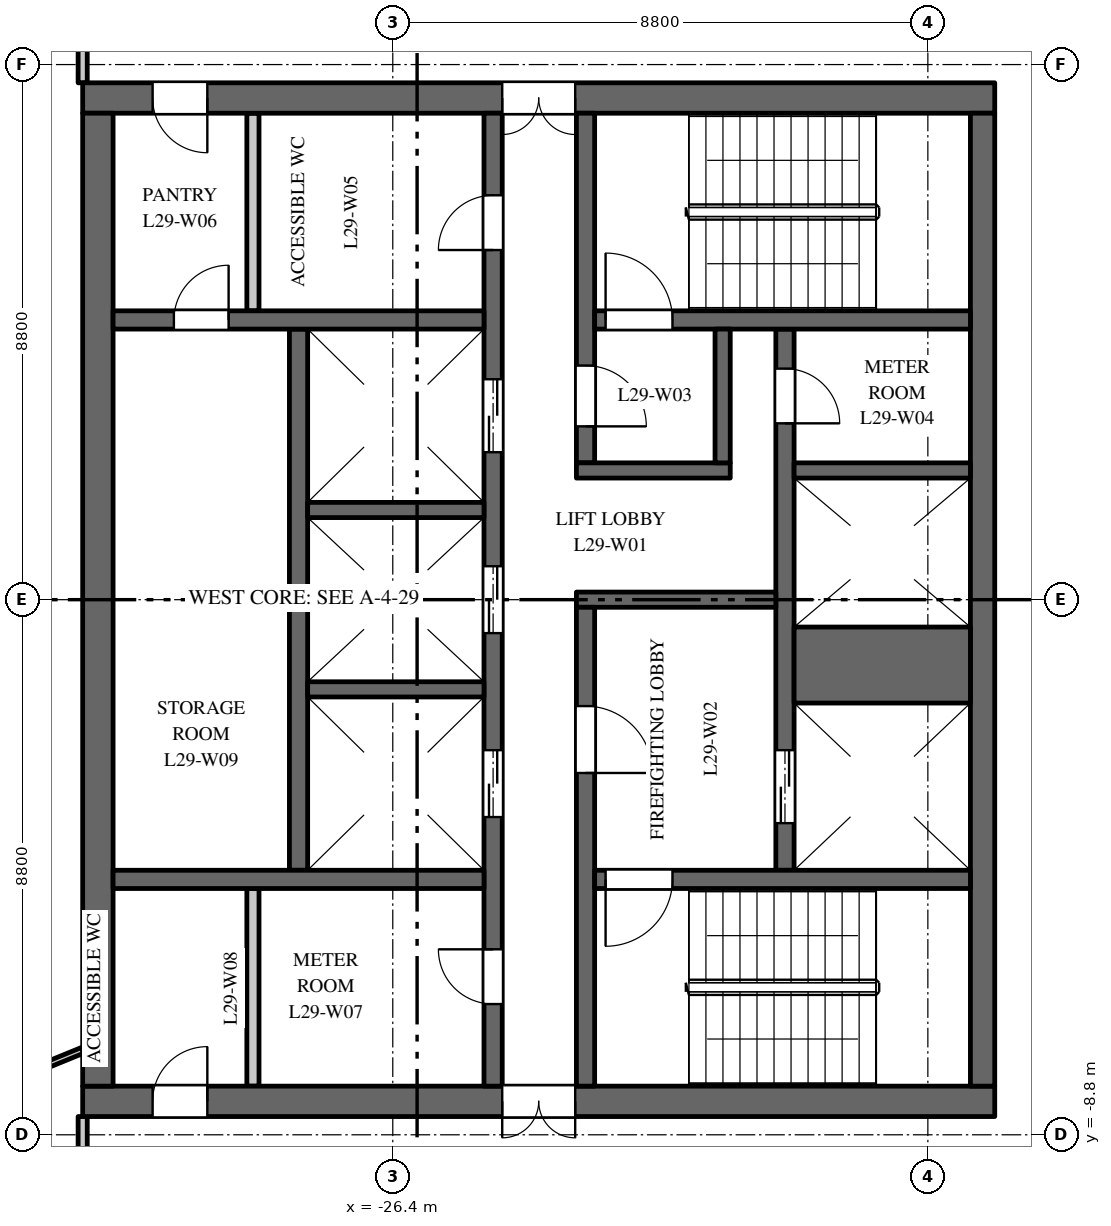
"""IFC4 building model, lengths in metres.
Left out: names, types, materials, properties, quantities, classifications, styles, units other than length and angle.
Written with IfcOpenShell. Run it as: python <this file> out.ifc"""

import sys

from ifc_helpers import new_model, si_unit, direction, frame, frame_2d, origin, place, context, subcontext, project, spatial, rectangle, extrude, element, fill, save


model = new_model("IFC4")
c1 = context("Model", 3, precision=1e-05, world=origin(), true_north=direction((0.0, 1.0)))
c2 = subcontext(c1, "Body", "Model", "MODEL_VIEW")
j1 = project(units=[si_unit("LENGTHUNIT", "METRE"), si_unit("PLANEANGLEUNIT", "RADIAN")], contexts=[c1])
p1 = place(None, origin())
s1 = spatial("IfcSite", under=j1, at=p1, CompositionType="ELEMENT")
p2 = place(p1, origin())
s2 = spatial("IfcBuilding", under=s1, at=p2, CompositionType="ELEMENT")
p3 = place(p2, frame((0.0, 0.0, 128.0)))
s3 = spatial("IfcBuildingStorey", under=s2, at=p3, CompositionType="ELEMENT", Elevation=128.0)
p4 = place(p3, frame((-16.5, 8.25, 0.0), z_axis=(0.0, 0.0, 1.0), x_axis=(-1.0, 0.0, 0.0)))
e1 = element("IfcWall", 1, at=p4, inside=s3, PredefinedType="SHEAR", context=c2, shape_type="SweptSolid", body=[
    extrude(rectangle(XDim=15.0, YDim=0.5, at=frame_2d((7.5, 0.0))), origin(), (0.0, 0.0, 1.0), 3.7),
])
p5 = place(p4, frame((6.9, 0.0, 0.0)))
e2 = element("IfcOpeningElement", 2, at=p5, cuts=e1, PredefinedType="OPENING", context=c2, shape_type="SweptSolid", body=[
    extrude(rectangle(XDim=1.2, YDim=2.1, at=frame_2d((0.6, 1.05))), frame((0.0, 0.26, 0.0), z_axis=(0.0, -1.0, 0.0), x_axis=(1.0, 0.0, 0.0)), (0.0, 0.0, 1.0), 0.52),
])
p6 = place(p4, frame((12.95, 0.0, 0.0)))
e3 = element("IfcOpeningElement", 3, at=p6, cuts=e1, PredefinedType="OPENING", context=c2, shape_type="SweptSolid", body=[
    extrude(rectangle(XDim=0.9, YDim=2.1, at=frame_2d((0.45, 1.05))), frame((0.0, 0.26, 0.0), z_axis=(0.0, -1.0, 0.0), x_axis=(1.0, 0.0, 0.0)), (0.0, 0.0, 1.0), 0.52),
])
p7 = place(p3, frame((-16.5, -8.25, 0.0), z_axis=(0.0, 0.0, 1.0), x_axis=(-1.0, 0.0, 0.0)))
e4 = element("IfcWall", 4, at=p7, inside=s3, PredefinedType="SHEAR", context=c2, shape_type="SweptSolid", body=[
    extrude(rectangle(XDim=15.0, YDim=0.5, at=frame_2d((7.5, 0.0))), origin(), (0.0, 0.0, 1.0), 3.7),
])
p8 = place(p7, frame((6.9, 0.0, 0.0)))
e5 = element("IfcOpeningElement", 5, at=p8, cuts=e4, PredefinedType="OPENING", context=c2, shape_type="SweptSolid", body=[
    extrude(rectangle(XDim=1.2, YDim=2.1, at=frame_2d((0.6, 1.05))), frame((0.0, 0.26, 0.0), z_axis=(0.0, -1.0, 0.0), x_axis=(1.0, 0.0, 0.0)), (0.0, 0.0, 1.0), 0.52),
])
p9 = place(p7, frame((12.95, 0.0, 0.0)))
e6 = element("IfcOpeningElement", 6, at=p9, cuts=e4, PredefinedType="OPENING", context=c2, shape_type="SweptSolid", body=[
    extrude(rectangle(XDim=0.9, YDim=2.1, at=frame_2d((0.45, 1.05))), frame((0.0, 0.26, 0.0), z_axis=(0.0, -1.0, 0.0), x_axis=(1.0, 0.0, 0.0)), (0.0, 0.0, 1.0), 0.52),
])
p10 = place(p3, frame((-27.95, -4.45, 0.0), z_axis=(0.0, 0.0, 1.0), x_axis=(0.0, 1.0, 0.0)))
e7 = element("IfcWall", 7, at=p10, inside=s3, PredefinedType="SHEAR", context=c2, shape_type="SweptSolid", body=[
    extrude(rectangle(XDim=8.9, YDim=0.3, at=frame_2d((4.45, 0.0))), origin(), (0.0, 0.0, 1.0), 3.7),
])
p11 = place(p3, frame((-19.95, -4.45, 0.0), z_axis=(0.0, 0.0, 1.0), x_axis=(0.0, 1.0, 0.0)))
e8 = element("IfcWall", 8, at=p11, inside=s3, PredefinedType="SHEAR", context=c2, shape_type="SweptSolid", body=[
    extrude(rectangle(XDim=8.9, YDim=0.3, at=frame_2d((4.45, 0.0))), origin(), (0.0, 0.0, 1.0), 3.7),
])
p12 = place(p11, frame((0.775, 0.0, 0.0)))
e9 = element("IfcOpeningElement", 9, at=p12, cuts=e8, PredefinedType="OPENING", context=c2, shape_type="SweptSolid", body=[
    extrude(rectangle(XDim=1.2, YDim=2.1, at=frame_2d((0.6, 1.05))), frame((0.0, 0.16, 0.0), z_axis=(0.0, -1.0, 0.0), x_axis=(1.0, 0.0, 0.0)), (0.0, 0.0, 1.0), 0.32),
])
p13 = place(p11, frame((7.35, 0.0, 0.0)))
e10 = element("IfcOpeningElement", 10, at=p13, cuts=e8, PredefinedType="OPENING", context=c2, shape_type="SweptSolid", body=[
    extrude(rectangle(XDim=0.9, YDim=2.1, at=frame_2d((0.45, 1.05))), frame((0.0, 0.16, 0.0), z_axis=(0.0, -1.0, 0.0), x_axis=(1.0, 0.0, 0.0)), (0.0, 0.0, 1.0), 0.32),
])
p14 = place(p3, frame((-24.75, -8.0, 0.0), z_axis=(0.0, 0.0, 1.0), x_axis=(0.0, 1.0, 0.0)))
e11 = element("IfcWall", 11, at=p14, inside=s3, PredefinedType="SHEAR", context=c2, shape_type="SweptSolid", body=[
    extrude(rectangle(XDim=16.0, YDim=0.3, at=frame_2d((8.0, 0.0))), origin(), (0.0, 0.0, 1.0), 3.7),
])
p15 = place(p14, frame((4.425, 0.0, 0.0)))
e12 = element("IfcOpeningElement", 12, at=p15, cuts=e11, PredefinedType="OPENING", context=c2, shape_type="SweptSolid", body=[
    extrude(rectangle(XDim=1.1, YDim=2.1, at=frame_2d((0.55, 1.05))), frame((0.0, 0.16, 0.0), z_axis=(0.0, -1.0, 0.0), x_axis=(1.0, 0.0, 0.0)), (0.0, 0.0, 1.0), 0.32),
])
p16 = place(p14, frame((7.45, 0.0, 0.0)))
e13 = element("IfcOpeningElement", 13, at=p16, cuts=e11, PredefinedType="OPENING", context=c2, shape_type="SweptSolid", body=[
    extrude(rectangle(XDim=1.1, YDim=2.1, at=frame_2d((0.55, 1.05))), frame((0.0, 0.16, 0.0), z_axis=(0.0, -1.0, 0.0), x_axis=(1.0, 0.0, 0.0)), (0.0, 0.0, 1.0), 0.32),
])
p17 = place(p14, frame((10.425, 0.0, 0.0)))
e14 = element("IfcOpeningElement", 14, at=p17, cuts=e11, PredefinedType="OPENING", context=c2, shape_type="SweptSolid", body=[
    extrude(rectangle(XDim=1.2, YDim=2.1, at=frame_2d((0.6, 1.05))), frame((0.0, 0.16, 0.0), z_axis=(0.0, -1.0, 0.0), x_axis=(1.0, 0.0, 0.0)), (0.0, 0.0, 1.0), 0.32),
])
p18 = place(p14, frame((13.75, 0.0, 0.0)))
e15 = element("IfcOpeningElement", 15, at=p18, cuts=e11, PredefinedType="OPENING", context=c2, shape_type="SweptSolid", body=[
    extrude(rectangle(XDim=0.9, YDim=2.1, at=frame_2d((0.45, 1.05))), frame((0.0, 0.16, 0.0), z_axis=(0.0, -1.0, 0.0), x_axis=(1.0, 0.0, 0.0)), (0.0, 0.0, 1.0), 0.32),
])
p19 = place(p14, frame((1.35, 0.0, 0.0)))
e16 = element("IfcOpeningElement", 16, at=p19, cuts=e11, PredefinedType="OPENING", context=c2, shape_type="SweptSolid", body=[
    extrude(rectangle(XDim=0.9, YDim=2.1, at=frame_2d((0.45, 1.05))), frame((0.0, 0.16, 0.0), z_axis=(0.0, -1.0, 0.0), x_axis=(1.0, 0.0, 0.0)), (0.0, 0.0, 1.0), 0.32),
])
p20 = place(p3, frame((-20.1, 0.0, 0.0), z_axis=(0.0, 0.0, 1.0), x_axis=(-1.0, 0.0, 0.0)))
e17 = element("IfcWall", 17, at=p20, inside=s3, PredefinedType="SHEAR", context=c2, shape_type="SweptSolid", body=[
    extrude(rectangle(XDim=3.28, YDim=0.25, at=frame_2d((1.64, 0.0))), origin(), (0.0, 0.0, 1.0), 3.7),
])
p21 = place(p3, frame((-16.7, -8.0, 0.0), z_axis=(0.0, 0.0, 1.0), x_axis=(0.0, 1.0, 0.0)))
e18 = element("IfcWall", 18, at=p21, inside=s3, PredefinedType="SHEAR", context=c2, shape_type="SweptSolid", body=[
    extrude(rectangle(XDim=16.0, YDim=0.4, at=frame_2d((8.0, 0.0))), origin(), (0.0, 0.0, 1.0), 3.7),
])
p22 = place(p3, frame((-31.25, -8.0, 0.0), z_axis=(0.0, 0.0, 1.0), x_axis=(0.0, 1.0, 0.0)))
e19 = element("IfcWall", 19, at=p22, inside=s3, PredefinedType="SHEAR", context=c2, shape_type="SweptSolid", body=[
    extrude(rectangle(XDim=16.0, YDim=0.5, at=frame_2d((8.0, 0.0))), origin(), (0.0, 0.0, 1.0), 3.7),
])
p23 = place(p3, frame((-24.9, 4.6, 0.0), z_axis=(0.0, 0.0, 1.0), x_axis=(-1.0, 0.0, 0.0)))
e20 = element("IfcWall", 20, at=p23, inside=s3, PredefinedType="SHEAR", context=c2, shape_type="SweptSolid", body=[
    extrude(rectangle(XDim=6.1, YDim=0.3, at=frame_2d((3.05, 0.0))), origin(), (0.0, 0.0, 1.0), 3.7),
])
p24 = place(p23, frame((4.2, 0.0, 0.0)))
e21 = element("IfcOpeningElement", 21, at=p24, cuts=e20, PredefinedType="OPENING", context=c2, shape_type="SweptSolid", body=[
    extrude(rectangle(XDim=0.9, YDim=2.1, at=frame_2d((0.45, 1.05))), frame((0.0, 0.16, 0.0), z_axis=(0.0, -1.0, 0.0), x_axis=(1.0, 0.0, 0.0)), (0.0, 0.0, 1.0), 0.32),
])
for number, where, z_axis, x_axis in (
    (22, (-28.7, 4.75, 0.0), (0.0, 0.0, 1.0), (0.0, 1.0, 0.0)),
    (23, (-28.7, -8.0, 0.0), (0.0, 0.0, 1.0), (0.0, 1.0, 0.0)),
):
    element("IfcWall", number, at=place(p3, frame(where, z_axis=z_axis, x_axis=x_axis)), inside=s3, PredefinedType="PARTITIONING", context=c2, shape_type="SweptSolid", body=[
        extrude(rectangle(XDim=3.25, YDim=0.2, at=frame_2d((1.625, 0.0))), origin(), (0.0, 0.0, 1.0), 3.7),
    ])
p25 = place(p3, frame((-24.9, -4.6, 0.0), z_axis=(0.0, 0.0, 1.0), x_axis=(-1.0, 0.0, 0.0)))
e24 = element("IfcWall", 24, at=p25, inside=s3, PredefinedType="SHEAR", context=c2, shape_type="SweptSolid", body=[
    extrude(rectangle(XDim=6.1, YDim=0.3, at=frame_2d((3.05, 0.0))), origin(), (0.0, 0.0, 1.0), 3.7),
])
p26 = place(p3, frame((-16.9, -1.075, 0.0), z_axis=(0.0, 0.0, 1.0), x_axis=(-1.0, 0.0, 0.0)))
e25 = element("IfcWall", 25, at=p26, inside=s3, PredefinedType="SHEAR", context=c2, shape_type="SweptSolid", body=[
    extrude(rectangle(XDim=2.9, YDim=1.25, at=frame_2d((1.45, 0.0))), origin(), (0.0, 0.0, 1.0), 3.7),
])
for number, where, z_axis, x_axis in (
    (26, (-16.9, 2.125, 0.0), (0.0, 0.0, 1.0), (-1.0, 0.0, 0.0)),
    (27, (-24.9, -1.475, 0.0), (0.0, 0.0, 1.0), (-1.0, 0.0, 0.0)),
    (28, (-24.9, 1.475, 0.0), (0.0, 0.0, 1.0), (-1.0, 0.0, 0.0)),
):
    element("IfcWall", number, at=place(p3, frame(where, z_axis=z_axis, x_axis=x_axis)), inside=s3, PredefinedType="SHEAR", context=c2, shape_type="SweptSolid", body=[
        extrude(rectangle(XDim=2.9, YDim=0.25, at=frame_2d((1.45, 0.0))), origin(), (0.0, 0.0, 1.0), 3.7),
    ])
p27 = place(p3, frame((-23.23, 2.25, 0.0), z_axis=(0.0, 0.0, 1.0), x_axis=(0.0, 1.0, 0.0)))
e29 = element("IfcWall", 29, at=p27, inside=s3, PredefinedType="SHEAR", context=c2, shape_type="SweptSolid", body=[
    extrude(rectangle(XDim=5.75, YDim=0.3, at=frame_2d((2.875, 0.0))), origin(), (0.0, 0.0, 1.0), 3.7),
])
p28 = place(p27, frame((0.6, 0.0, 0.0)))
e30 = element("IfcOpeningElement", 30, at=p28, cuts=e29, PredefinedType="OPENING", context=c2, shape_type="SweptSolid", body=[
    extrude(rectangle(XDim=1.0, YDim=2.1, at=frame_2d((0.5, 1.05))), frame((0.0, 0.16, 0.0), z_axis=(0.0, -1.0, 0.0), x_axis=(1.0, 0.0, 0.0)), (0.0, 0.0, 1.0), 0.32),
])
p29 = place(p3, frame((-23.23, -8.0, 0.0), z_axis=(0.0, 0.0, 1.0), x_axis=(0.0, 1.0, 0.0)))
e31 = element("IfcWall", 31, at=p29, inside=s3, PredefinedType="SHEAR", context=c2, shape_type="SweptSolid", body=[
    extrude(rectangle(XDim=7.875, YDim=0.3, at=frame_2d((3.938, 0.0))), origin(), (0.0, 0.0, 1.0), 3.7),
])
p30 = place(p29, frame((5.15, 0.0, 0.0)))
e32 = element("IfcOpeningElement", 32, at=p30, cuts=e31, PredefinedType="OPENING", context=c2, shape_type="SweptSolid", body=[
    extrude(rectangle(XDim=1.1, YDim=2.1, at=frame_2d((0.55, 1.05))), frame((0.0, 0.16, 0.0), z_axis=(0.0, -1.0, 0.0), x_axis=(1.0, 0.0, 0.0)), (0.0, 0.0, 1.0), 0.32),
])
p31 = place(p3, frame((-16.9, 4.6, 0.0), z_axis=(0.0, 0.0, 1.0), x_axis=(-1.0, 0.0, 0.0)))
e33 = element("IfcWall", 33, at=p31, inside=s3, PredefinedType="SHEAR", context=c2, shape_type="SweptSolid", body=[
    extrude(rectangle(XDim=6.18, YDim=0.3, at=frame_2d((3.09, 0.0))), origin(), (0.0, 0.0, 1.0), 3.7),
])
p32 = place(p31, frame((4.9, 0.0, 0.0)))
e34 = element("IfcOpeningElement", 34, at=p32, cuts=e33, PredefinedType="OPENING", context=c2, shape_type="SweptSolid", body=[
    extrude(rectangle(XDim=1.1, YDim=2.1, at=frame_2d((0.55, 1.05))), frame((0.0, 0.16, 0.0), z_axis=(0.0, -1.0, 0.0), x_axis=(1.0, 0.0, 0.0)), (0.0, 0.0, 1.0), 0.32),
])
p33 = place(p3, frame((-16.9, -4.6, 0.0), z_axis=(0.0, 0.0, 1.0), x_axis=(-1.0, 0.0, 0.0)))
e35 = element("IfcWall", 35, at=p33, inside=s3, PredefinedType="SHEAR", context=c2, shape_type="SweptSolid", body=[
    extrude(rectangle(XDim=6.18, YDim=0.3, at=frame_2d((3.09, 0.0))), origin(), (0.0, 0.0, 1.0), 3.7),
])
p34 = place(p33, frame((4.9, 0.0, 0.0)))
e36 = element("IfcOpeningElement", 36, at=p34, cuts=e35, PredefinedType="OPENING", context=c2, shape_type="SweptSolid", body=[
    extrude(rectangle(XDim=1.1, YDim=2.1, at=frame_2d((0.55, 1.05))), frame((0.0, 0.16, 0.0), z_axis=(0.0, -1.0, 0.0), x_axis=(1.0, 0.0, 0.0)), (0.0, 0.0, 1.0), 0.32),
])
p35 = place(p3, frame((-20.85, 2.125, 0.0), z_axis=(0.0, 0.0, 1.0), x_axis=(-1.0, 0.0, 0.0)))
e37 = element("IfcWall", 37, at=p35, inside=s3, PredefinedType="SHEAR", context=c2, shape_type="SweptSolid", body=[
    extrude(rectangle(XDim=2.53, YDim=0.25, at=frame_2d((1.265, 0.0))), origin(), (0.0, 0.0, 1.0), 3.7),
])
p36 = place(p3, frame((-20.975, 2.25, 0.0), z_axis=(0.0, 0.0, 1.0), x_axis=(0.0, 1.0, 0.0)))
e38 = element("IfcWall", 38, at=p36, inside=s3, PredefinedType="SHEAR", context=c2, shape_type="SweptSolid", body=[
    extrude(rectangle(XDim=2.2, YDim=0.25, at=frame_2d((1.1, 0.0))), origin(), (0.0, 0.0, 1.0), 3.7),
])
p37 = place(p3, frame((-34.234, -8.53, 0.0), z_axis=(0.0, 0.0, 1.0), x_axis=(0.925344112436, 0.379128307542, 0.0)))
e39 = element("IfcWall", 39, at=p37, inside=s3, PredefinedType="PARTITIONING", context=c2, shape_type="SweptSolid", body=[
    extrude(rectangle(XDim=2.954, YDim=0.1, at=frame_2d((1.477, 0.0))), origin(), (0.0, 0.0, 1.0), 2.9),
])
for number, where, z_axis, x_axis in (
    (40, (-31.5, -10.7, 0.0), (0.0, 0.0, 1.0), (0.0, 1.0, 0.0)),
    (41, (-31.5, 8.5, 0.0), (0.0, 0.0, 1.0), (0.0, 1.0, 0.0)),
):
    element("IfcWall", number, at=place(p3, frame(where, z_axis=z_axis, x_axis=x_axis)), inside=s3, PredefinedType="PARTITIONING", context=c2, shape_type="SweptSolid", body=[
        extrude(rectangle(XDim=2.2, YDim=0.15, at=frame_2d((1.1, 0.0))), origin(), (0.0, 0.0, 1.0), 3.7),
    ])
p38 = place(p12, origin())
e42 = element("IfcDoor", 42, at=p38, inside=s3, OperationType="DOUBLE_DOOR_SLIDING", PredefinedType="DOOR", context=c2, shape_type="SweptSolid", body=[
    extrude(rectangle(XDim=1.2, YDim=2.1, at=frame_2d((0.6, 1.05))), frame((0.0, 0.025, 0.0), z_axis=(0.0, -1.0, 0.0), x_axis=(1.0, 0.0, 0.0)), (0.0, 0.0, 1.0), 0.05),
])
fill(e9, e42)
p39 = place(p15, origin())
e43 = element("IfcDoor", 43, at=p39, inside=s3, OperationType="DOUBLE_DOOR_SLIDING", PredefinedType="DOOR", context=c2, shape_type="SweptSolid", body=[
    extrude(rectangle(XDim=1.1, YDim=2.1, at=frame_2d((0.55, 1.05))), frame((0.0, 0.025, 0.0), z_axis=(0.0, -1.0, 0.0), x_axis=(1.0, 0.0, 0.0)), (0.0, 0.0, 1.0), 0.05),
])
fill(e12, e43)
p40 = place(p16, origin())
e44 = element("IfcDoor", 44, at=p40, inside=s3, OperationType="DOUBLE_DOOR_SLIDING", PredefinedType="DOOR", context=c2, shape_type="SweptSolid", body=[
    extrude(rectangle(XDim=1.1, YDim=2.1, at=frame_2d((0.55, 1.05))), frame((0.0, 0.025, 0.0), z_axis=(0.0, -1.0, 0.0), x_axis=(1.0, 0.0, 0.0)), (0.0, 0.0, 1.0), 0.05),
])
fill(e13, e44)
p41 = place(p17, origin())
e45 = element("IfcDoor", 45, at=p41, inside=s3, OperationType="DOUBLE_DOOR_SLIDING", PredefinedType="DOOR", context=c2, shape_type="SweptSolid", body=[
    extrude(rectangle(XDim=1.2, YDim=2.1, at=frame_2d((0.6, 1.05))), frame((0.0, 0.025, 0.0), z_axis=(0.0, -1.0, 0.0), x_axis=(1.0, 0.0, 0.0)), (0.0, 0.0, 1.0), 0.05),
])
fill(e14, e45)
p42 = place(p32, origin())
e46 = element("IfcDoor", 46, at=p42, inside=s3, OperationType="SINGLE_SWING_RIGHT", PredefinedType="DOOR", context=c2, shape_type="SweptSolid", body=[
    extrude(rectangle(XDim=1.1, YDim=2.1, at=frame_2d((0.55, 1.05))), frame((0.0, 0.025, 0.0), z_axis=(0.0, -1.0, 0.0), x_axis=(1.0, 0.0, 0.0)), (0.0, 0.0, 1.0), 0.05),
])
fill(e34, e46)
p43 = place(p34, origin())
e47 = element("IfcDoor", 47, at=p43, inside=s3, OperationType="SINGLE_SWING_LEFT", PredefinedType="DOOR", context=c2, shape_type="SweptSolid", body=[
    extrude(rectangle(XDim=1.1, YDim=2.1, at=frame_2d((0.55, 1.05))), frame((0.0, 0.025, 0.0), z_axis=(0.0, -1.0, 0.0), x_axis=(1.0, 0.0, 0.0)), (0.0, 0.0, 1.0), 0.05),
])
fill(e36, e47)
p44 = place(p30, origin())
e48 = element("IfcDoor", 48, at=p44, inside=s3, OperationType="SINGLE_SWING_LEFT", PredefinedType="DOOR", context=c2, shape_type="SweptSolid", body=[
    extrude(rectangle(XDim=1.1, YDim=2.1, at=frame_2d((0.55, 1.05))), frame((0.0, 0.025, 0.0), z_axis=(0.0, -1.0, 0.0), x_axis=(1.0, 0.0, 0.0)), (0.0, 0.0, 1.0), 0.05),
])
fill(e32, e48)
p45 = place(p28, origin())
e49 = element("IfcDoor", 49, at=p45, inside=s3, OperationType="SINGLE_SWING_LEFT", PredefinedType="DOOR", context=c2, shape_type="SweptSolid", body=[
    extrude(rectangle(XDim=1.0, YDim=2.1, at=frame_2d((0.5, 1.05))), frame((0.0, 0.025, 0.0), z_axis=(0.0, -1.0, 0.0), x_axis=(1.0, 0.0, 0.0)), (0.0, 0.0, 1.0), 0.05),
])
fill(e30, e49)
p46 = place(p5, origin())
e50 = element("IfcDoor", 50, at=p46, inside=s3, OperationType="DOUBLE_DOOR_DOUBLE_SWING", PredefinedType="DOOR", context=c2, shape_type="SweptSolid", body=[
    extrude(rectangle(XDim=1.2, YDim=2.1, at=frame_2d((0.6, 1.05))), frame((0.0, 0.025, 0.0), z_axis=(0.0, -1.0, 0.0), x_axis=(1.0, 0.0, 0.0)), (0.0, 0.0, 1.0), 0.05),
])
fill(e2, e50)
p47 = place(p8, origin())
e51 = element("IfcDoor", 51, at=p47, inside=s3, OperationType="DOUBLE_DOOR_DOUBLE_SWING", PredefinedType="DOOR", context=c2, shape_type="SweptSolid", body=[
    extrude(rectangle(XDim=1.2, YDim=2.1, at=frame_2d((0.6, 1.05))), frame((0.0, 0.025, 0.0), z_axis=(0.0, -1.0, 0.0), x_axis=(1.0, 0.0, 0.0)), (0.0, 0.0, 1.0), 0.05),
])
fill(e5, e51)
p48 = place(p13, origin())
e52 = element("IfcDoor", 52, at=p48, inside=s3, OperationType="SINGLE_SWING_LEFT", PredefinedType="DOOR", context=c2, shape_type="SweptSolid", body=[
    extrude(rectangle(XDim=0.9, YDim=2.1, at=frame_2d((0.45, 1.05))), frame((0.0, 0.025, 0.0), z_axis=(0.0, -1.0, 0.0), x_axis=(1.0, 0.0, 0.0)), (0.0, 0.0, 1.0), 0.05),
])
fill(e10, e52)
p49 = place(p18, origin())
e53 = element("IfcDoor", 53, at=p49, inside=s3, OperationType="SINGLE_SWING_RIGHT", PredefinedType="DOOR", context=c2, shape_type="SweptSolid", body=[
    extrude(rectangle(XDim=0.9, YDim=2.1, at=frame_2d((0.45, 1.05))), frame((0.0, 0.025, 0.0), z_axis=(0.0, -1.0, 0.0), x_axis=(1.0, 0.0, 0.0)), (0.0, 0.0, 1.0), 0.05),
])
fill(e15, e53)
p50 = place(p6, origin())
e54 = element("IfcDoor", 54, at=p50, inside=s3, OperationType="SINGLE_SWING_RIGHT", PredefinedType="DOOR", context=c2, shape_type="SweptSolid", body=[
    extrude(rectangle(XDim=0.9, YDim=2.1, at=frame_2d((0.45, 1.05))), frame((0.0, 0.025, 0.0), z_axis=(0.0, -1.0, 0.0), x_axis=(1.0, 0.0, 0.0)), (0.0, 0.0, 1.0), 0.05),
])
fill(e3, e54)
p51 = place(p19, origin())
e55 = element("IfcDoor", 55, at=p51, inside=s3, OperationType="SINGLE_SWING_LEFT", PredefinedType="DOOR", context=c2, shape_type="SweptSolid", body=[
    extrude(rectangle(XDim=0.9, YDim=2.1, at=frame_2d((0.45, 1.05))), frame((0.0, 0.025, 0.0), z_axis=(0.0, -1.0, 0.0), x_axis=(1.0, 0.0, 0.0)), (0.0, 0.0, 1.0), 0.05),
])
fill(e16, e55)
p52 = place(p9, origin())
e56 = element("IfcDoor", 56, at=p52, inside=s3, OperationType="SINGLE_SWING_LEFT", PredefinedType="DOOR", context=c2, shape_type="SweptSolid", body=[
    extrude(rectangle(XDim=0.9, YDim=2.1, at=frame_2d((0.45, 1.05))), frame((0.0, 0.025, 0.0), z_axis=(0.0, -1.0, 0.0), x_axis=(1.0, 0.0, 0.0)), (0.0, 0.0, 1.0), 0.05),
])
fill(e6, e56)
p53 = place(p24, origin())
e57 = element("IfcDoor", 57, at=p53, inside=s3, OperationType="SINGLE_SWING_LEFT", PredefinedType="DOOR", context=c2, shape_type="SweptSolid", body=[
    extrude(rectangle(XDim=0.9, YDim=2.1, at=frame_2d((0.45, 1.05))), frame((0.0, 0.025, 0.0), z_axis=(0.0, -1.0, 0.0), x_axis=(1.0, 0.0, 0.0)), (0.0, 0.0, 1.0), 0.05),
])
fill(e21, e57)
save(model, sys.argv[1])
